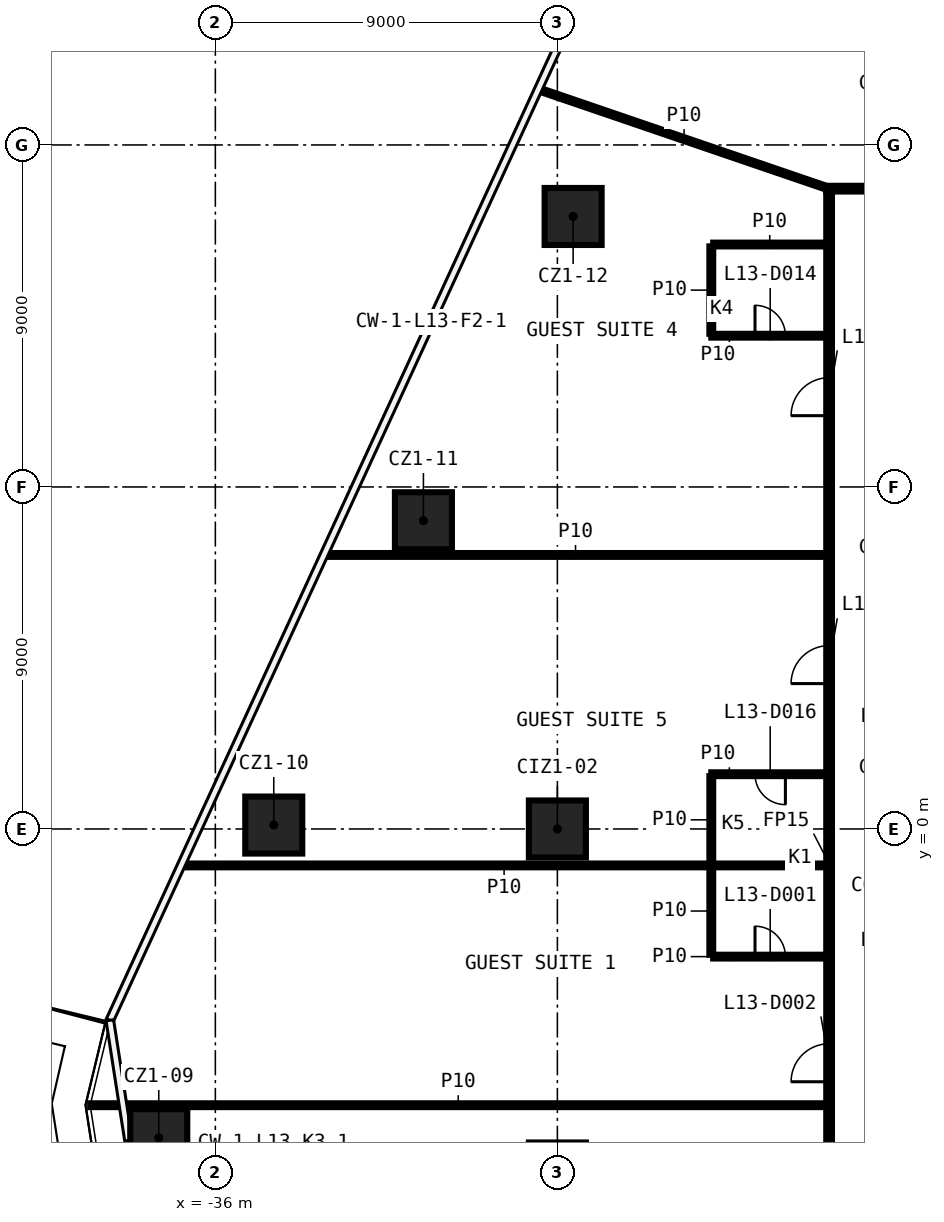
"""IFC4 building model, lengths in metres.
Left out: names, types, materials, properties, quantities, classifications, styles, units other than length and angle.
Written with IfcOpenShell. Run it as: python <this file> out.ifc"""

import sys

from ifc_helpers import new_model, si_unit, direction, frame, frame_2d, origin, origin_2d, place, context, subcontext, project, spatial, rectangle, extrude, element, fill, save


model = new_model("IFC4")
c1 = context("Model", 3, precision=1e-05, world=origin(), true_north=direction((0.0, 1.0)))
c2 = subcontext(c1, "Body", "Model", "MODEL_VIEW")
j1 = project(units=[si_unit("LENGTHUNIT", "METRE"), si_unit("PLANEANGLEUNIT", "RADIAN")], contexts=[c1])
p1 = place(None, origin())
s1 = spatial("IfcSite", under=j1, at=p1, CompositionType="ELEMENT")
p2 = place(p1, origin())
s2 = spatial("IfcBuilding", under=s1, at=p2, CompositionType="ELEMENT")
p3 = place(p2, frame((0.0, 0.0, 69.9)))
s3 = spatial("IfcBuildingStorey", under=s2, at=p3, CompositionType="ELEMENT", Elevation=69.9)
for number, where, z_axis, x_axis in (
    (1, (-37.489, -8.123, 0.0), (0.0, 0.0, 1.0), (1.0, 0.0, 0.0)),
    (2, (-34.463, 0.103, 0.0), (0.0, 0.0, 1.0), (1.0, 0.0, 0.0)),
    (3, (-30.525, 8.111, 0.0), (0.0, 0.0, 1.0), (1.0, 0.0, 0.0)),
    (4, (-26.586, 16.118, 0.0), (0.0, 0.0, 1.0), (1.0, 0.0, 0.0)),
    (5, (-27.0, 0.0, 0.0), (0.0, 0.0, 1.0), (1.0, 0.0, 0.0)),
):
    element("IfcColumn", number, at=place(p3, frame(where, z_axis=z_axis, x_axis=x_axis)), inside=s3, PredefinedType="COLUMN", context=c2, shape_type="SweptSolid", body=[
        extrude(rectangle(XDim=1.5, YDim=1.5, at=origin_2d()), origin(), (0.0, 0.0, 1.0), 3.3),
    ])
p4 = place(p3, frame((-39.293, -7.269, 0.0), z_axis=(0.0, 0.0, 1.0), x_axis=(1.0, 0.0, 0.0)))
e6 = element("IfcWall", 6, at=p4, inside=s3, PredefinedType="PARTITIONING", context=c2, shape_type="SweptSolid", body=[
    extrude(rectangle(XDim=19.368, YDim=0.1, at=frame_2d((9.684, 0.0))), origin(), (0.0, 0.0, 1.0), 3.3),
])
p5 = place(p3, frame((-22.9, -3.359, 0.0), z_axis=(0.0, 0.0, 1.0), x_axis=(1.0, 0.0, 0.0)))
e7 = element("IfcWall", 7, at=p5, inside=s3, PredefinedType="PARTITIONING", context=c2, shape_type="SweptSolid", body=[
    extrude(rectangle(XDim=2.975, YDim=0.1, at=frame_2d((1.487, 0.0))), origin(), (0.0, 0.0, 1.0), 3.3),
])
p6 = place(p5, frame((1.1, 0.0, 0.0)))
e8 = element("IfcOpeningElement", 8, at=p6, cuts=e7, PredefinedType="OPENING", context=c2, shape_type="SweptSolid", body=[
    extrude(rectangle(XDim=0.8, YDim=2.1, at=frame_2d((0.4, 1.05))), frame((0.0, 0.06, 0.0), z_axis=(0.0, -1.0, 0.0), x_axis=(1.0, 0.0, 0.0)), (0.0, 0.0, 1.0), 0.12),
])
p7 = place(p3, frame((-36.879, -0.959, 0.0), z_axis=(0.0, 0.0, 1.0), x_axis=(1.0, 0.0, 0.0)))
e9 = element("IfcWall", 9, at=p7, inside=s3, PredefinedType="PARTITIONING", context=c2, shape_type="SweptSolid", body=[
    extrude(rectangle(XDim=16.954, YDim=0.1, at=frame_2d((8.477, 0.0))), origin(), (0.0, 0.0, 1.0), 3.3),
])
p8 = place(p3, frame((-19.925, 1.441, 0.0), z_axis=(0.0, 0.0, 1.0), x_axis=(-1.0, 0.0, 0.0)))
e10 = element("IfcWall", 10, at=p8, inside=s3, PredefinedType="PARTITIONING", context=c2, shape_type="SweptSolid", body=[
    extrude(rectangle(XDim=3.025, YDim=0.1, at=frame_2d((1.512, 0.0))), origin(), (0.0, 0.0, 1.0), 3.3),
])
p9 = place(p8, frame((1.075, 0.0, 0.0)))
e11 = element("IfcOpeningElement", 11, at=p9, cuts=e10, PredefinedType="OPENING", context=c2, shape_type="SweptSolid", body=[
    extrude(rectangle(XDim=0.8, YDim=2.1, at=frame_2d((0.4, 1.05))), frame((0.0, 0.06, 0.0), z_axis=(0.0, -1.0, 0.0), x_axis=(1.0, 0.0, 0.0)), (0.0, 0.0, 1.0), 0.12),
])
p10 = place(p3, frame((-33.12, 7.211, 0.0), z_axis=(0.0, 0.0, 1.0), x_axis=(1.0, 0.0, 0.0)))
e12 = element("IfcWall", 12, at=p10, inside=s3, PredefinedType="PARTITIONING", context=c2, shape_type="SweptSolid", body=[
    extrude(rectangle(XDim=13.195, YDim=0.1, at=frame_2d((6.597, 0.0))), origin(), (0.0, 0.0, 1.0), 3.3),
])
p11 = place(p3, frame((-22.95, 12.98, 0.0), z_axis=(0.0, 0.0, 1.0), x_axis=(1.0, 0.0, 0.0)))
e13 = element("IfcWall", 13, at=p11, inside=s3, PredefinedType="PARTITIONING", context=c2, shape_type="SweptSolid", body=[
    extrude(rectangle(XDim=3.025, YDim=0.1, at=frame_2d((1.512, 0.0))), origin(), (0.0, 0.0, 1.0), 3.3),
])
p12 = place(p11, frame((1.15, 0.0, 0.0)))
e14 = element("IfcOpeningElement", 14, at=p12, cuts=e13, PredefinedType="OPENING", context=c2, shape_type="SweptSolid", body=[
    extrude(rectangle(XDim=0.8, YDim=2.1, at=frame_2d((0.4, 1.05))), frame((0.0, 0.06, 0.0), z_axis=(0.0, -1.0, 0.0), x_axis=(1.0, 0.0, 0.0)), (0.0, 0.0, 1.0), 0.12),
])
p13 = place(p3, frame((-22.9, 15.38, 0.0), z_axis=(0.0, 0.0, 1.0), x_axis=(1.0, 0.0, 0.0)))
e15 = element("IfcWall", 15, at=p13, inside=s3, PredefinedType="PARTITIONING", context=c2, shape_type="SweptSolid", body=[
    extrude(rectangle(XDim=2.975, YDim=0.1, at=frame_2d((1.487, 0.0))), origin(), (0.0, 0.0, 1.0), 3.3),
])
p14 = place(p3, frame((-19.925, 16.85, 0.0), z_axis=(0.0, 0.0, 1.0), x_axis=(1.0, 0.0, 0.0)))
e16 = element("IfcWall", 16, at=p14, inside=s3, PredefinedType="PARTITIONING", context=c2, shape_type="SweptSolid", body=[
    extrude(rectangle(XDim=39.85, YDim=0.15, at=frame_2d((19.925, 0.0))), origin(), (0.0, 0.0, 1.0), 3.3),
])
p15 = place(p14, frame((31.436, 0.0, 0.0)))
e17 = element("IfcOpeningElement", 17, at=p15, cuts=e16, PredefinedType="OPENING", context=c2, shape_type="SweptSolid", body=[
    extrude(rectangle(XDim=0.9, YDim=2.1, at=frame_2d((0.45, 1.05))), frame((0.0, 0.085, 0.0), z_axis=(0.0, -1.0, 0.0), x_axis=(1.0, 0.0, 0.0)), (0.0, 0.0, 1.0), 0.17),
])
p16 = place(p14, frame((16.954, 0.0, 0.0)))
e18 = element("IfcOpeningElement", 18, at=p16, cuts=e16, PredefinedType="OPENING", context=c2, shape_type="SweptSolid", body=[
    extrude(rectangle(XDim=0.9, YDim=2.1, at=frame_2d((0.45, 1.05))), frame((0.0, 0.085, 0.0), z_axis=(0.0, -1.0, 0.0), x_axis=(1.0, 0.0, 0.0)), (0.0, 0.0, 1.0), 0.17),
])
p17 = place(p14, frame((7.208, 0.0, 0.0)))
e19 = element("IfcOpeningElement", 19, at=p17, cuts=e16, PredefinedType="OPENING", context=c2, shape_type="SweptSolid", body=[
    extrude(rectangle(XDim=0.9, YDim=2.1, at=frame_2d((0.45, 1.05))), frame((0.0, 0.085, 0.0), z_axis=(0.0, -1.0, 0.0), x_axis=(1.0, 0.0, 0.0)), (0.0, 0.0, 1.0), 0.17),
])
p18 = place(p3, frame((-19.85, -16.775, 0.0), z_axis=(0.0, 0.0, 1.0), x_axis=(0.0, 1.0, 0.0)))
e20 = element("IfcWall", 20, at=p18, inside=s3, PredefinedType="PARTITIONING", context=c2, shape_type="SweptSolid", body=[
    extrude(rectangle(XDim=33.55, YDim=0.15, at=frame_2d((16.775, 0.0))), origin(), (0.0, 0.0, 1.0), 3.3),
])
p19 = place(p18, frame((10.123, 0.0, 0.0)))
e21 = element("IfcOpeningElement", 21, at=p19, cuts=e20, PredefinedType="OPENING", context=c2, shape_type="SweptSolid", body=[
    extrude(rectangle(XDim=1.0, YDim=2.1, at=frame_2d((0.5, 1.05))), frame((0.0, 0.085, 0.0), z_axis=(0.0, -1.0, 0.0), x_axis=(1.0, 0.0, 0.0)), (0.0, 0.0, 1.0), 0.17),
])
p20 = place(p18, frame((4.179, 0.0, 0.0)))
e22 = element("IfcOpeningElement", 22, at=p20, cuts=e20, PredefinedType="OPENING", context=c2, shape_type="SweptSolid", body=[
    extrude(rectangle(XDim=0.9, YDim=2.1, at=frame_2d((0.45, 1.05))), frame((0.0, 0.085, 0.0), z_axis=(0.0, -1.0, 0.0), x_axis=(1.0, 0.0, 0.0)), (0.0, 0.0, 1.0), 0.17),
])
p21 = place(p18, frame((27.651, 0.0, 0.0)))
e23 = element("IfcOpeningElement", 23, at=p21, cuts=e20, PredefinedType="OPENING", context=c2, shape_type="SweptSolid", body=[
    extrude(rectangle(XDim=1.0, YDim=2.1, at=frame_2d((0.5, 1.05))), frame((0.0, 0.085, 0.0), z_axis=(0.0, -1.0, 0.0), x_axis=(1.0, 0.0, 0.0)), (0.0, 0.0, 1.0), 0.17),
])
p22 = place(p18, frame((20.601, 0.0, 0.0)))
e24 = element("IfcOpeningElement", 24, at=p22, cuts=e20, PredefinedType="OPENING", context=c2, shape_type="SweptSolid", body=[
    extrude(rectangle(XDim=1.0, YDim=2.1, at=frame_2d((0.5, 1.05))), frame((0.0, 0.085, 0.0), z_axis=(0.0, -1.0, 0.0), x_axis=(1.0, 0.0, 0.0)), (0.0, 0.0, 1.0), 0.17),
])
p23 = place(p3, frame((-22.95, -3.309, 0.0), z_axis=(0.0, 0.0, 1.0), x_axis=(0.0, 1.0, 0.0)))
e25 = element("IfcWall", 25, at=p23, inside=s3, PredefinedType="PARTITIONING", context=c2, shape_type="SweptSolid", body=[
    extrude(rectangle(XDim=2.3, YDim=0.1, at=frame_2d((1.15, 0.0))), origin(), (0.0, 0.0, 1.0), 3.3),
])
for number, where, z_axis, x_axis in (
    (26, (-22.95, -0.909, 0.0), (0.0, 0.0, 1.0), (0.0, 1.0, 0.0)),
    (27, (-22.95, 13.03, 0.0), (0.0, 0.0, 1.0), (0.0, 1.0, 0.0)),
):
    element("IfcWall", number, at=place(p3, frame(where, z_axis=z_axis, x_axis=x_axis)), inside=s3, PredefinedType="PARTITIONING", context=c2, shape_type="SweptSolid", body=[
        extrude(rectangle(XDim=2.3, YDim=0.1, at=frame_2d((1.15, 0.0))), origin(), (0.0, 0.0, 1.0), 3.3),
    ])
p24 = place(p3, frame((-27.484, 19.458, 0.0), z_axis=(0.0, 0.0, 1.0), x_axis=(0.946262238114, -0.323400335065, 0.0)))
e28 = element("IfcWall", 28, at=p24, inside=s3, PredefinedType="PARTITIONING", context=c2, shape_type="SweptSolid", body=[
    extrude(rectangle(XDim=8.067, YDim=0.1, at=frame_2d((4.034, 0.0))), origin(), (0.0, 0.0, 1.0), 3.3),
])
p25 = place(p6, origin())
e29 = element("IfcDoor", 29, at=p25, inside=s3, OperationType="SINGLE_SWING_LEFT", PredefinedType="DOOR", context=c2, shape_type="SweptSolid", body=[
    extrude(rectangle(XDim=0.8, YDim=2.1, at=frame_2d((0.4, 1.05))), frame((0.0, 0.025, 0.0), z_axis=(0.0, -1.0, 0.0), x_axis=(1.0, 0.0, 0.0)), (0.0, 0.0, 1.0), 0.05),
])
fill(e8, e29)
p26 = place(p19, origin())
e30 = element("IfcDoor", 30, at=p26, inside=s3, OperationType="SINGLE_SWING_RIGHT", PredefinedType="DOOR", context=c2, shape_type="SweptSolid", body=[
    extrude(rectangle(XDim=1.0, YDim=2.1, at=frame_2d((0.5, 1.05))), frame((0.0, 0.025, 0.0), z_axis=(0.0, -1.0, 0.0), x_axis=(1.0, 0.0, 0.0)), (0.0, 0.0, 1.0), 0.05),
])
fill(e21, e30)
p27 = place(p12, origin())
e31 = element("IfcDoor", 31, at=p27, inside=s3, OperationType="SINGLE_SWING_LEFT", PredefinedType="DOOR", context=c2, shape_type="SweptSolid", body=[
    extrude(rectangle(XDim=0.8, YDim=2.1, at=frame_2d((0.4, 1.05))), frame((0.0, 0.025, 0.0), z_axis=(0.0, -1.0, 0.0), x_axis=(1.0, 0.0, 0.0)), (0.0, 0.0, 1.0), 0.05),
])
fill(e14, e31)
p28 = place(p21, origin())
e32 = element("IfcDoor", 32, at=p28, inside=s3, OperationType="SINGLE_SWING_RIGHT", PredefinedType="DOOR", context=c2, shape_type="SweptSolid", body=[
    extrude(rectangle(XDim=1.0, YDim=2.1, at=frame_2d((0.5, 1.05))), frame((0.0, 0.025, 0.0), z_axis=(0.0, -1.0, 0.0), x_axis=(1.0, 0.0, 0.0)), (0.0, 0.0, 1.0), 0.05),
])
fill(e23, e32)
p29 = place(p9, origin())
e33 = element("IfcDoor", 33, at=p29, inside=s3, OperationType="SINGLE_SWING_RIGHT", PredefinedType="DOOR", context=c2, shape_type="SweptSolid", body=[
    extrude(rectangle(XDim=0.8, YDim=2.1, at=frame_2d((0.4, 1.05))), frame((0.0, 0.025, 0.0), z_axis=(0.0, -1.0, 0.0), x_axis=(1.0, 0.0, 0.0)), (0.0, 0.0, 1.0), 0.05),
])
fill(e11, e33)
p30 = place(p22, origin())
e34 = element("IfcDoor", 34, at=p30, inside=s3, OperationType="SINGLE_SWING_LEFT", PredefinedType="DOOR", context=c2, shape_type="SweptSolid", body=[
    extrude(rectangle(XDim=1.0, YDim=2.1, at=frame_2d((0.5, 1.05))), frame((0.0, 0.025, 0.0), z_axis=(0.0, -1.0, 0.0), x_axis=(1.0, 0.0, 0.0)), (0.0, 0.0, 1.0), 0.05),
])
fill(e24, e34)
save(model, sys.argv[1])
